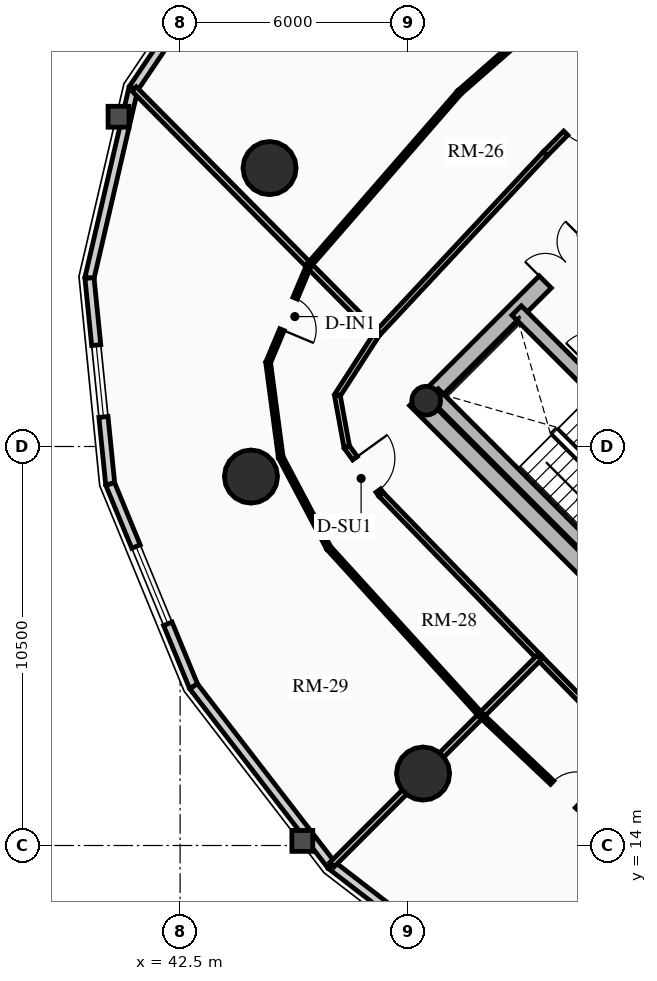
"""IFC4 building model, lengths in metres.
Left out: names, types, materials, properties, quantities, classifications, styles, units other than length and angle.
Written with IfcOpenShell. Run it as: python <this file> out.ifc"""

import sys

from ifc_helpers import new_model, si_unit, direction, frame, frame_2d, origin, origin_2d, place, context, subcontext, project, spatial, rectangle, circle, hollow_circle, extrude, source, transform, mapped, element, fill, save


model = new_model("IFC4")
c1 = context("Model", 3, precision=1e-05, world=origin(), true_north=direction((0.0, 1.0)))
c2 = subcontext(c1, "Body", "Model", "MODEL_VIEW")
j1 = project(units=[si_unit("LENGTHUNIT", "METRE"), si_unit("PLANEANGLEUNIT", "RADIAN")], contexts=[c1])
p1 = place(None, origin())
s1 = spatial("IfcSite", under=j1, at=p1, CompositionType="ELEMENT")
p2 = place(p1, origin())
s2 = spatial("IfcBuilding", under=s1, at=p2, CompositionType="ELEMENT")
p3 = place(p2, frame((0.0, 0.0, 90.52)))
s3 = spatial("IfcBuildingStorey", under=s2, at=p3, CompositionType="ELEMENT", Elevation=90.52)
p4 = place(p3, frame((58.737, 15.697, 0.0), z_axis=(0.0, 0.0, 1.0), x_axis=(-0.707106781187, 0.707106781187, 0.0)))
e1 = element("IfcWall", 1, at=p4, inside=s3, PredefinedType="SHEAR", context=c2, shape_type="SweptSolid", body=[
    extrude(rectangle(XDim=14.2, YDim=0.45, at=frame_2d((7.1, 0.0))), origin(), (0.0, 0.0, 1.0), 2.91),
])
p5 = place(p3, frame((48.856, 25.578, 0.0), z_axis=(0.0, 0.0, 1.0), x_axis=(0.707106781187, 0.707106781187, 0.0)))
e2 = element("IfcWall", 2, at=p5, inside=s3, PredefinedType="SHEAR", context=c2, shape_type="SweptSolid", body=[
    extrude(rectangle(XDim=10.7, YDim=0.45, at=frame_2d((5.35, 0.0))), origin(), (0.0, 0.0, 1.0), 2.91),
])
m1 = source(origin(), c2, "Body", "SweptSolid", [
    extrude(rectangle(XDim=1.5, YDim=2.02, at=frame_2d((0.75, 1.01))), frame((0.0, 0.235, 0.0), z_axis=(0.0, -1.0, 0.0), x_axis=(1.0, 0.0, 0.0)), (0.0, 0.0, 1.0), 0.47),
])
p6 = place(p5, frame((4.6, 0.0, 0.0)))
e3 = element("IfcOpeningElement", 3, at=p6, cuts=e2, PredefinedType="OPENING", context=c2, shape_type="MappedRepresentation", body=[
    mapped(m1, transform((0.0, 0.0, 0.0), x_axis=(1.0, 0.0, 0.0), y_axis=(0.0, 1.0, 0.0), z_axis=(0.0, 0.0, 1.0), scale=1.0)),
])
p7 = place(p3, frame((61.078, 18.355, 0.0), z_axis=(0.0, 0.0, 1.0), x_axis=(-0.707106781187, 0.707106781187, 0.0)))
e4 = element("IfcWall", 4, at=p7, inside=s3, PredefinedType="SHEAR", context=c2, shape_type="SweptSolid", body=[
    extrude(rectangle(XDim=13.75, YDim=0.35, at=frame_2d((6.875, 0.0))), origin(), (0.0, 0.0, 1.0), 2.91),
])
m2 = source(origin(), c2, "Body", "SweptSolid", [
    extrude(rectangle(XDim=1.1, YDim=2.015, at=frame_2d((0.55, 1.007))), frame((0.0, 0.185, 0.0), z_axis=(0.0, -1.0, 0.0), x_axis=(1.0, 0.0, 0.0)), (0.0, 0.0, 1.0), 0.37),
])
p8 = place(p7, frame((4.875, 0.0, 0.0)))
e5 = element("IfcOpeningElement", 5, at=p8, cuts=e4, PredefinedType="OPENING", context=c2, shape_type="MappedRepresentation", body=[
    mapped(m2, transform((0.0, 0.0, 0.0), x_axis=(1.0, 0.0, 0.0), y_axis=(0.0, 1.0, 0.0), z_axis=(0.0, 0.0, 1.0), scale=1.0)),
])
m3 = source(origin(), c2, "Body", "SweptSolid", [
    extrude(rectangle(XDim=1.15, YDim=2.02, at=frame_2d((0.575, 1.01))), frame((0.0, 0.185, 0.0), z_axis=(0.0, -1.0, 0.0), x_axis=(1.0, 0.0, 0.0)), (0.0, 0.0, 1.0), 0.37),
])
p9 = place(p7, frame((7.295, 0.0, 0.0)))
e6 = element("IfcOpeningElement", 6, at=p9, cuts=e4, PredefinedType="OPENING", context=c2, shape_type="MappedRepresentation", body=[
    mapped(m3, transform((0.0, 0.0, 0.0), x_axis=(1.0, 0.0, 0.0), y_axis=(0.0, 1.0, 0.0), z_axis=(0.0, 0.0, 1.0), scale=1.0)),
])
p10 = place(p3, frame((53.922, 21.141, 0.0), z_axis=(0.0, 0.0, 1.0), x_axis=(-0.707088616009, 0.707124945897, 0.0)))
e7 = element("IfcWall", 7, at=p10, inside=s3, PredefinedType="SHEAR", context=c2, shape_type="SweptSolid", body=[
    extrude(rectangle(XDim=6.72, YDim=0.35, at=frame_2d((3.36, 0.0))), origin(), (0.0, 0.0, 1.0), 2.91),
])
p11 = place(p3, frame((48.976, 25.706, 0.0), z_axis=(0.0, 0.0, 1.0), x_axis=(0.707106781187, 0.707106781187, 0.0)))
e8 = element("IfcColumn", 8, at=p11, inside=s3, PredefinedType="COLUMN", context=c2, shape_type="SweptSolid", body=[
    extrude(hollow_circle(Radius=0.38, WallThickness=0.032, at=origin_2d()), origin(), (0.0, 0.0, 1.0), 2.91),
])
for number, where, z_axis, x_axis in (
    (9, (44.854, 31.827, 0.0), (0.0, 0.0, 1.0), (1.0, 0.0, 0.0)),
    (10, (44.365, 23.709, 0.0), (0.0, 0.0, 1.0), (1.0, 0.0, 0.0)),
    (11, (48.893, 15.893, 0.0), (0.0, 0.0, 1.0), (1.0, 0.0, 0.0)),
):
    element("IfcColumn", number, at=place(p3, frame(where, z_axis=z_axis, x_axis=x_axis)), inside=s3, PredefinedType="USERDEFINED", context=c2, shape_type="SweptSolid", body=[
        extrude(circle(Radius=0.7, at=origin_2d()), origin(), (0.0, 0.0, 1.0), 2.91),
    ])
p12 = place(p3, frame((41.271, 33.92, 0.0), z_axis=(0.0, 0.0, 1.0), x_axis=(0.559572880421, 0.828781148131, 0.0)))
e12 = element("IfcWall", 12, at=p12, inside=s3, PredefinedType="SOLIDWALL", context=c2, shape_type="SweptSolid", body=[
    extrude(rectangle(XDim=4.905, YDim=0.24, at=frame_2d((2.452, 0.0))), origin(), (0.0, 0.0, 1.0), 2.179),
])
m4 = source(origin(), c2, "Body", "SweptSolid", [
    extrude(rectangle(XDim=2.2, YDim=1.35, at=frame_2d((1.1, 0.675))), frame((0.0, 0.13, 0.0), z_axis=(0.0, -1.0, 0.0), x_axis=(1.0, 0.0, 0.0)), (0.0, 0.0, 1.0), 0.26),
])
p13 = place(p12, frame((1.352, 0.0, 0.65)))
e13 = element("IfcOpeningElement", 13, at=p13, cuts=e12, PredefinedType="OPENING", context=c2, shape_type="MappedRepresentation", body=[
    mapped(m4, transform((0.0, 0.0, 0.0), x_axis=(1.0, 0.0, 0.0), y_axis=(0.0, 1.0, 0.0), z_axis=(0.0, 0.0, 1.0), scale=1.0)),
])
p14 = place(p3, frame((40.115, 28.933, 0.0), z_axis=(0.0, 0.0, 1.0), x_axis=(0.225834725257, 0.974165631126, 0.0)))
e14 = element("IfcWall", 14, at=p14, inside=s3, PredefinedType="SOLIDWALL", context=c2, shape_type="SweptSolid", body=[
    extrude(rectangle(XDim=5.119, YDim=0.24, at=frame_2d((2.56, 0.0))), origin(), (0.0, 0.0, 1.0), 2.179),
])
p15 = place(p3, frame((40.661, 23.513, 0.0), z_axis=(0.0, 0.0, 1.0), x_axis=(-0.10015591906, 0.994971754311, 0.0)))
e15 = element("IfcWall", 15, at=p15, inside=s3, PredefinedType="SOLIDWALL", context=c2, shape_type="SweptSolid", body=[
    extrude(rectangle(XDim=5.448, YDim=0.24, at=frame_2d((2.724, 0.0))), origin(), (0.0, 0.0, 1.0), 2.179),
])
m5 = source(origin(), c2, "Body", "SweptSolid", [
    extrude(rectangle(XDim=1.9, YDim=1.35, at=frame_2d((0.95, 0.675))), frame((0.0, 0.13, 0.0), z_axis=(0.0, -1.0, 0.0), x_axis=(1.0, 0.0, 0.0)), (0.0, 0.0, 1.0), 0.26),
])
p16 = place(p15, frame((1.774, 0.0, 0.65)))
e16 = element("IfcOpeningElement", 16, at=p16, cuts=e15, PredefinedType="OPENING", context=c2, shape_type="MappedRepresentation", body=[
    mapped(m5, transform((0.0, 0.0, 0.0), x_axis=(1.0, 0.0, 0.0), y_axis=(0.0, 1.0, 0.0), z_axis=(0.0, 0.0, 1.0), scale=1.0)),
])
p17 = place(p3, frame((42.855, 18.189, 0.0), z_axis=(0.0, 0.0, 1.0), x_axis=(-0.381027003055, 0.924563909604, 0.0)))
e17 = element("IfcWall", 17, at=p17, inside=s3, PredefinedType="SOLIDWALL", context=c2, shape_type="SweptSolid", body=[
    extrude(rectangle(XDim=5.758, YDim=0.24, at=frame_2d((2.879, 0.0))), origin(), (0.0, 0.0, 1.0), 2.179),
])
p18 = place(p17, frame((1.779, 0.0, 0.65)))
e18 = element("IfcOpeningElement", 18, at=p18, cuts=e17, PredefinedType="OPENING", context=c2, shape_type="MappedRepresentation", body=[
    mapped(m4, transform((0.0, 0.0, 0.0), x_axis=(1.0, 0.0, 0.0), y_axis=(0.0, 1.0, 0.0), z_axis=(0.0, 0.0, 1.0), scale=1.0)),
])
p19 = place(p3, frame((46.483, 13.483, 0.0), z_axis=(0.0, 0.0, 1.0), x_axis=(-0.61054437102, 0.791982052206, 0.0)))
e19 = element("IfcWall", 19, at=p19, inside=s3, PredefinedType="SOLIDWALL", context=c2, shape_type="SweptSolid", body=[
    extrude(rectangle(XDim=5.942, YDim=0.24, at=frame_2d((2.971, 0.0))), origin(), (0.0, 0.0, 1.0), 2.179),
])
p20 = place(p3, frame((51.189, 9.855, 0.0), z_axis=(0.0, 0.0, 1.0), x_axis=(-0.791982052206, 0.61054437102, 0.0)))
e20 = element("IfcWall", 20, at=p20, inside=s3, PredefinedType="SOLIDWALL", context=c2, shape_type="SweptSolid", body=[
    extrude(rectangle(XDim=5.942, YDim=0.24, at=frame_2d((2.971, 0.0))), origin(), (0.0, 0.0, 1.0), 2.179),
])
p21 = place(p20, frame((2.021, 0.0, 0.65)))
e21 = element("IfcOpeningElement", 21, at=p21, cuts=e20, PredefinedType="OPENING", context=c2, shape_type="MappedRepresentation", body=[
    mapped(m5, transform((0.0, 0.0, 0.0), x_axis=(1.0, 0.0, 0.0), y_axis=(0.0, 1.0, 0.0), z_axis=(0.0, 0.0, 1.0), scale=1.0)),
])
p22 = place(p3, frame((54.475, 34.591, 0.0), z_axis=(0.0, 0.0, 1.0), x_axis=(-0.703869646439, -0.710329163714, 0.0)))
e22 = element("IfcWall", 22, at=p22, inside=s3, PredefinedType="PARTITIONING", context=c2, shape_type="SweptSolid", body=[
    extrude(rectangle(XDim=3.364, YDim=0.15, at=frame_2d((1.682, 0.0))), origin(), (0.0, 0.0, 1.0), 2.225),
])
m6 = source(origin(), c2, "Body", "SweptSolid", [
    extrude(rectangle(XDim=1.05, YDim=2.015, at=frame_2d((0.525, 1.007))), frame((0.0, 0.085, 0.0), z_axis=(0.0, -1.0, 0.0), x_axis=(1.0, 0.0, 0.0)), (0.0, 0.0, 1.0), 0.17),
])
p23 = place(p22, frame((1.546, 0.0, 0.0)))
e23 = element("IfcOpeningElement", 23, at=p23, cuts=e22, PredefinedType="OPENING", context=c2, shape_type="MappedRepresentation", body=[
    mapped(m6, transform((0.0, 0.0, 0.0), x_axis=(1.0, 0.0, 0.0), y_axis=(0.0, 1.0, 0.0), z_axis=(0.0, 0.0, 1.0), scale=1.0)),
])
p24 = place(p3, frame((52.107, 32.202, 0.0), z_axis=(0.0, 0.0, 1.0), x_axis=(-0.682605209028, -0.730787334734, 0.0)))
e24 = element("IfcWall", 24, at=p24, inside=s3, PredefinedType="PARTITIONING", context=c2, shape_type="SweptSolid", body=[
    extrude(rectangle(XDim=6.486, YDim=0.15, at=frame_2d((3.243, 0.0))), origin(), (0.0, 0.0, 1.0), 2.225),
])
p25 = place(p3, frame((47.68, 27.462, 0.0), z_axis=(0.0, 0.0, 1.0), x_axis=(-0.542097952486, -0.840315303865, 0.0)))
e25 = element("IfcWall", 25, at=p25, inside=s3, PredefinedType="PARTITIONING", context=c2, shape_type="SweptSolid", body=[
    extrude(rectangle(XDim=1.923, YDim=0.15, at=frame_2d((0.961, 0.0))), origin(), (0.0, 0.0, 1.0), 2.225),
])
p26 = place(p3, frame((46.637, 25.846, 0.0), z_axis=(0.0, 0.0, 1.0), x_axis=(0.179617307107, -0.983736561782, 0.0)))
e26 = element("IfcWall", 26, at=p26, inside=s3, PredefinedType="PARTITIONING", context=c2, shape_type="SweptSolid", body=[
    extrude(rectangle(XDim=1.38, YDim=0.15, at=frame_2d((0.69, 0.0))), origin(), (0.0, 0.0, 1.0), 2.225),
])
p27 = place(p3, frame((46.885, 24.489, 0.0), z_axis=(0.0, 0.0, 1.0), x_axis=(0.585716430945, -0.810516047047, 0.0)))
e27 = element("IfcWall", 27, at=p27, inside=s3, PredefinedType="PARTITIONING", context=c2, shape_type="SweptSolid", body=[
    extrude(rectangle(XDim=1.539, YDim=0.15, at=frame_2d((0.77, 0.0))), origin(), (0.0, 0.0, 1.0), 2.225),
])
p28 = place(p27, frame((0.369, 0.0, 0.0)))
e28 = element("IfcOpeningElement", 28, at=p28, cuts=e27, PredefinedType="OPENING", context=c2, shape_type="MappedRepresentation", body=[
    mapped(m6, transform((0.0, 0.0, 0.0), x_axis=(1.0, 0.0, 0.0), y_axis=(0.0, 1.0, 0.0), z_axis=(0.0, 0.0, 1.0), scale=1.0)),
])
p29 = place(p3, frame((47.786, 23.242, 0.0), z_axis=(0.0, 0.0, 1.0), x_axis=(0.696183456981, -0.717863910659, 0.0)))
e29 = element("IfcWall", 29, at=p29, inside=s3, PredefinedType="PARTITIONING", context=c2, shape_type="SweptSolid", body=[
    extrude(rectangle(XDim=5.979, YDim=0.15, at=frame_2d((2.99, 0.0))), origin(), (0.0, 0.0, 1.0), 2.655),
])
p30 = place(p3, frame((51.949, 18.949, 0.0), z_axis=(0.0, 0.0, 1.0), x_axis=(0.699801520154, -0.714337337951, 0.0)))
e30 = element("IfcWall", 30, at=p30, inside=s3, PredefinedType="PARTITIONING", context=c2, shape_type="SweptSolid", body=[
    extrude(rectangle(XDim=6.097, YDim=0.15, at=frame_2d((3.048, 0.0))), origin(), (0.0, 0.0, 1.0), 2.225),
])
p31 = place(p3, frame((47.68, 27.462, 0.0), z_axis=(0.0, 0.0, 1.0), x_axis=(-0.703913074907, 0.710286127539, 0.0)))
e31 = element("IfcWall", 31, at=p31, inside=s3, PredefinedType="PARTITIONING", context=c2, shape_type="SweptSolid", body=[
    extrude(rectangle(XDim=9.079, YDim=0.16, at=frame_2d((4.54, 0.0))), origin(), (0.0, 0.0, 1.0), 2.179),
])
p32 = place(p3, frame((51.949, 18.949, 0.0), z_axis=(0.0, 0.0, 1.0), x_axis=(-0.707106781187, -0.707106781187, 0.0)))
e32 = element("IfcWall", 32, at=p32, inside=s3, PredefinedType="PARTITIONING", context=c2, shape_type="SweptSolid", body=[
    extrude(rectangle(XDim=7.711, YDim=0.16, at=frame_2d((3.855, 0.0))), origin(), (0.0, 0.0, 1.0), 2.179),
])
p33 = place(p3, frame((52.687, 36.305, 0.0), z_axis=(0.0, 0.0, 1.0), x_axis=(-0.752332345919, -0.658783759123, 0.0)))
e33 = element("IfcWall", 33, at=p33, inside=s3, PredefinedType="PARTITIONING", context=c2, shape_type="SweptSolid", body=[
    extrude(rectangle(XDim=3.776, YDim=0.125, at=frame_2d((1.888, 0.0))), origin(), (0.0, 0.0, 1.0), 2.225),
])
p34 = place(p3, frame((49.845, 33.817, 0.0), z_axis=(0.0, 0.0, 1.0), x_axis=(-0.656101508867, -0.754672650931, 0.0)))
e34 = element("IfcWall", 34, at=p34, inside=s3, PredefinedType="PARTITIONING", context=c2, shape_type="SweptSolid", body=[
    extrude(rectangle(XDim=6.029, YDim=0.125, at=frame_2d((3.014, 0.0))), origin(), (0.0, 0.0, 1.0), 2.225),
])
p35 = place(p3, frame((45.89, 29.268, 0.0), z_axis=(0.0, 0.0, 1.0), x_axis=(-0.387057419757, -0.922055613188, 0.0)))
e35 = element("IfcWall", 35, at=p35, inside=s3, PredefinedType="PARTITIONING", context=c2, shape_type="SweptSolid", body=[
    extrude(rectangle(XDim=2.774, YDim=0.125, at=frame_2d((1.387, 0.0))), origin(), (0.0, 0.0, 1.0), 2.225),
])
m7 = source(origin(), c2, "Body", "SweptSolid", [
    extrude(rectangle(XDim=0.9, YDim=2.005, at=frame_2d((0.45, 1.002))), frame((0.0, 0.073, 0.0), z_axis=(0.0, -1.0, 0.0), x_axis=(1.0, 0.0, 0.0)), (0.0, 0.0, 1.0), 0.145),
])
p36 = place(p35, frame((0.937, 0.0, 0.0)))
e36 = element("IfcOpeningElement", 36, at=p36, cuts=e35, PredefinedType="OPENING", context=c2, shape_type="MappedRepresentation", body=[
    mapped(m7, transform((0.0, 0.0, 0.0), x_axis=(1.0, 0.0, 0.0), y_axis=(0.0, 1.0, 0.0), z_axis=(0.0, 0.0, 1.0), scale=1.0)),
])
p37 = place(p3, frame((44.816, 26.71, 0.0), z_axis=(0.0, 0.0, 1.0), x_axis=(0.131724981355, -0.991286300363, 0.0)))
e37 = element("IfcWall", 37, at=p37, inside=s3, PredefinedType="PARTITIONING", context=c2, shape_type="SweptSolid", body=[
    extrude(rectangle(XDim=2.515, YDim=0.125, at=frame_2d((1.258, 0.0))), origin(), (0.0, 0.0, 1.0), 2.655),
])
p38 = place(p3, frame((45.148, 24.217, 0.0), z_axis=(0.0, 0.0, 1.0), x_axis=(0.46760107134, -0.883939612237, 0.0)))
e38 = element("IfcWall", 38, at=p38, inside=s3, PredefinedType="PARTITIONING", context=c2, shape_type="SweptSolid", body=[
    extrude(rectangle(XDim=2.7, YDim=0.125, at=frame_2d((1.35, 0.0))), origin(), (0.0, 0.0, 1.0), 2.225),
])
p39 = place(p3, frame((46.41, 21.83, 0.0), z_axis=(0.0, 0.0, 1.0), x_axis=(0.6732109009, -0.739450527696, 0.0)))
e39 = element("IfcWall", 39, at=p39, inside=s3, PredefinedType="PARTITIONING", context=c2, shape_type="SweptSolid", body=[
    extrude(rectangle(XDim=5.96, YDim=0.125, at=frame_2d((2.98, 0.0))), origin(), (0.0, 0.0, 1.0), 2.655),
])
p40 = place(p3, frame((50.423, 17.423, 0.0), z_axis=(0.0, 0.0, 1.0), x_axis=(0.726497320663, -0.68716929724, 0.0)))
e40 = element("IfcWall", 40, at=p40, inside=s3, PredefinedType="PARTITIONING", context=c2, shape_type="SweptSolid", body=[
    extrude(rectangle(XDim=6.04, YDim=0.125, at=frame_2d((3.02, 0.0))), origin(), (0.0, 0.0, 1.0), 2.225),
])
p41 = place(p40, frame((2.57, 0.0, 0.0)))
e41 = element("IfcOpeningElement", 41, at=p41, cuts=e40, PredefinedType="OPENING", context=c2, shape_type="MappedRepresentation", body=[
    mapped(m7, transform((0.0, 0.0, 0.0), x_axis=(1.0, 0.0, 0.0), y_axis=(0.0, 1.0, 0.0), z_axis=(0.0, 0.0, 1.0), scale=1.0)),
])
m8 = source(origin(), c2, "Body", "SweptSolid", [
    extrude(rectangle(XDim=1.9, YDim=1.35, at=frame_2d((0.95, 0.675))), frame((0.0, 0.03, 0.0), z_axis=(0.0, -1.0, 0.0), x_axis=(1.0, 0.0, 0.0)), (0.0, 0.0, 1.0), 0.06),
])
p42 = place(p16, origin())
e42 = element("IfcWindow", 42, at=p42, inside=s3, PartitioningType="DOUBLE_PANEL_VERTICAL", PredefinedType="WINDOW", context=c2, shape_type="MappedRepresentation", body=[
    mapped(m8, transform((0.0, 0.0, 0.0), x_axis=(1.0, 0.0, 0.0), y_axis=(0.0, 1.0, 0.0), z_axis=(0.0, 0.0, 1.0), scale=1.0)),
])
fill(e16, e42)
m9 = source(origin(), c2, "Body", "SweptSolid", [
    extrude(rectangle(XDim=2.2, YDim=1.35, at=frame_2d((1.1, 0.675))), frame((0.0, 0.03, 0.0), z_axis=(0.0, -1.0, 0.0), x_axis=(1.0, 0.0, 0.0)), (0.0, 0.0, 1.0), 0.06),
])
p43 = place(p18, origin())
e43 = element("IfcWindow", 43, at=p43, inside=s3, PartitioningType="DOUBLE_PANEL_VERTICAL", PredefinedType="WINDOW", context=c2, shape_type="MappedRepresentation", body=[
    mapped(m9, transform((0.0, 0.0, 0.0), x_axis=(1.0, 0.0, 0.0), y_axis=(0.0, 1.0, 0.0), z_axis=(0.0, 0.0, 1.0), scale=1.0)),
])
fill(e18, e43)
m10 = source(origin(), c2, "Body", "SweptSolid", [
    extrude(rectangle(XDim=1.5, YDim=2.02, at=frame_2d((0.75, 1.01))), frame((0.0, 0.025, 0.0), z_axis=(0.0, -1.0, 0.0), x_axis=(1.0, 0.0, 0.0)), (0.0, 0.0, 1.0), 0.05),
])
p44 = place(p6, origin())
e44 = element("IfcDoor", 44, at=p44, inside=s3, OperationType="DOUBLE_DOOR_SINGLE_SWING", PredefinedType="DOOR", context=c2, shape_type="MappedRepresentation", body=[
    mapped(m10, transform((0.0, 0.0, 0.0), x_axis=(1.0, 0.0, 0.0), y_axis=(0.0, 1.0, 0.0), z_axis=(0.0, 0.0, 1.0), scale=1.0)),
])
fill(e3, e44)
m11 = source(origin(), c2, "Body", "SweptSolid", [
    extrude(rectangle(XDim=1.05, YDim=2.015, at=frame_2d((0.525, 1.007))), frame((0.0, 0.025, 0.0), z_axis=(0.0, -1.0, 0.0), x_axis=(1.0, 0.0, 0.0)), (0.0, 0.0, 1.0), 0.05),
])
p45 = place(p23, origin())
e45 = element("IfcDoor", 45, at=p45, inside=s3, OperationType="SINGLE_SWING_LEFT", PredefinedType="DOOR", context=c2, shape_type="MappedRepresentation", body=[
    mapped(m11, transform((0.0, 0.0, 0.0), x_axis=(1.0, 0.0, 0.0), y_axis=(0.0, 1.0, 0.0), z_axis=(0.0, 0.0, 1.0), scale=1.0)),
])
fill(e23, e45)
p46 = place(p28, origin())
e46 = element("IfcDoor", 46, at=p46, inside=s3, OperationType="SINGLE_SWING_LEFT", PredefinedType="DOOR", context=c2, shape_type="MappedRepresentation", body=[
    mapped(m11, transform((0.0, 0.0, 0.0), x_axis=(1.0, 0.0, 0.0), y_axis=(0.0, 1.0, 0.0), z_axis=(0.0, 0.0, 1.0), scale=1.0)),
])
fill(e28, e46)
m12 = source(origin(), c2, "Body", "SweptSolid", [
    extrude(rectangle(XDim=0.9, YDim=2.005, at=frame_2d((0.45, 1.002))), frame((0.0, 0.025, 0.0), z_axis=(0.0, -1.0, 0.0), x_axis=(1.0, 0.0, 0.0)), (0.0, 0.0, 1.0), 0.05),
])
p47 = place(p36, origin())
e47 = element("IfcDoor", 47, at=p47, inside=s3, OperationType="SINGLE_SWING_RIGHT", PredefinedType="DOOR", context=c2, shape_type="MappedRepresentation", body=[
    mapped(m12, transform((0.0, 0.0, 0.0), x_axis=(1.0, 0.0, 0.0), y_axis=(0.0, 1.0, 0.0), z_axis=(0.0, 0.0, 1.0), scale=1.0)),
])
fill(e36, e47)
p48 = place(p41, origin())
e48 = element("IfcDoor", 48, at=p48, inside=s3, OperationType="SINGLE_SWING_RIGHT", PredefinedType="DOOR", context=c2, shape_type="MappedRepresentation", body=[
    mapped(m12, transform((0.0, 0.0, 0.0), x_axis=(1.0, 0.0, 0.0), y_axis=(0.0, 1.0, 0.0), z_axis=(0.0, 0.0, 1.0), scale=1.0)),
])
fill(e41, e48)
save(model, sys.argv[1])
